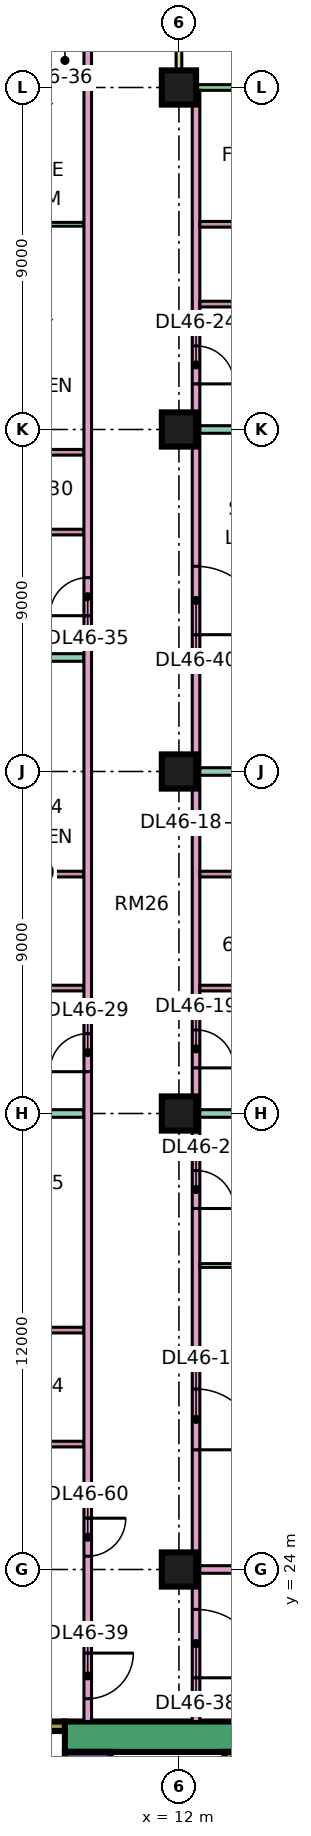
"""IFC4 building model, lengths in metres.
Left out: names, types, materials, properties, quantities, classifications, styles, units other than length and angle.
Written with IfcOpenShell. Run it as: python <this file> out.ifc"""

import sys

from ifc_helpers import new_model, si_unit, direction, frame, frame_2d, origin, origin_2d, place, context, subcontext, project, spatial, rectangle, extrude, element, fill, save


model = new_model("IFC4")
c1 = context("Model", 3, precision=1e-05, world=origin(), true_north=direction((0.0, 1.0)))
c2 = subcontext(c1, "Body", "Model", "MODEL_VIEW")
j1 = project(units=[si_unit("LENGTHUNIT", "METRE"), si_unit("PLANEANGLEUNIT", "RADIAN")], contexts=[c1])
p1 = place(None, origin())
s1 = spatial("IfcSite", under=j1, at=p1, CompositionType="ELEMENT")
p2 = place(p1, origin())
s2 = spatial("IfcBuilding", under=s1, at=p2, CompositionType="ELEMENT")
p3 = place(p2, frame((0.0, 0.0, 198.65)))
s3 = spatial("IfcBuildingStorey", under=s2, at=p3, CompositionType="ELEMENT", Elevation=198.65)
for number, where, z_axis, x_axis in (
    (1, (12.0, 24.0, 0.0), (0.0, 0.0, 1.0), (1.0, 0.0, 0.0)),
    (2, (12.0, 36.0, 0.0), (0.0, 0.0, 1.0), (1.0, 0.0, 0.0)),
    (3, (12.0, 45.0, 0.0), (0.0, 0.0, 1.0), (1.0, 0.0, 0.0)),
    (4, (12.0, 54.0, 0.0), (0.0, 0.0, 1.0), (1.0, 0.0, 0.0)),
    (5, (12.0, 63.0, 0.0), (0.0, 0.0, 1.0), (1.0, 0.0, 0.0)),
):
    element("IfcColumn", number, at=place(p3, frame(where, z_axis=z_axis, x_axis=x_axis)), inside=s3, PredefinedType="COLUMN", context=c2, shape_type="SweptSolid", body=[
        extrude(rectangle(XDim=0.9, YDim=0.9, at=origin_2d()), origin(), (0.0, 0.0, 1.0), 3.75),
    ])
p4 = place(p3, frame((9.0, 19.6, 0.0), z_axis=(0.0, 0.0, 1.0), x_axis=(1.0, 0.0, 0.0)))
e6 = element("IfcWall", 6, at=p4, inside=s3, PredefinedType="SHEAR", context=c2, shape_type="SweptSolid", body=[
    extrude(rectangle(XDim=25.0, YDim=0.8, at=frame_2d((12.5, 0.0))), origin(), (0.0, 0.0, 1.0), 3.75),
])
p5 = place(p4, frame((19.1, 0.0, 0.0)))
e7 = element("IfcOpeningElement", 7, at=p5, cuts=e6, PredefinedType="OPENING", context=c2, shape_type="SweptSolid", body=[
    extrude(rectangle(XDim=1.8, YDim=2.4, at=frame_2d((0.9, 1.2))), frame((0.0, 0.41, 0.0), z_axis=(0.0, -1.0, 0.0), x_axis=(1.0, 0.0, 0.0)), (0.0, 0.0, 1.0), 0.82),
])
p6 = place(p3, frame((9.6, 7.8, 0.0), z_axis=(0.0, 0.0, 1.0), x_axis=(0.0, 1.0, 0.0)))
e8 = element("IfcWall", 8, at=p6, inside=s3, PredefinedType="SHEAR", context=c2, shape_type="SweptSolid", body=[
    extrude(rectangle(XDim=11.4, YDim=1.2, at=frame_2d((5.7, 0.0))), origin(), (0.0, 0.0, 1.0), 3.75),
])
p7 = place(p6, frame((4.075, 0.0, 0.0)))
e9 = element("IfcOpeningElement", 9, at=p7, cuts=e8, PredefinedType="OPENING", context=c2, shape_type="SweptSolid", body=[
    extrude(rectangle(XDim=1.1, YDim=2.2, at=frame_2d((0.55, 1.1))), frame((0.0, 0.61, 0.0), z_axis=(0.0, -1.0, 0.0), x_axis=(1.0, 0.0, 0.0)), (0.0, 0.0, 1.0), 1.22),
])
p8 = place(p6, frame((6.575, 0.0, 0.0)))
e10 = element("IfcOpeningElement", 10, at=p8, cuts=e8, PredefinedType="OPENING", context=c2, shape_type="SweptSolid", body=[
    extrude(rectangle(XDim=1.1, YDim=2.2, at=frame_2d((0.55, 1.1))), frame((0.0, 0.61, 0.0), z_axis=(0.0, -1.0, 0.0), x_axis=(1.0, 0.0, 0.0)), (0.0, 0.0, 1.0), 1.22),
])
p9 = place(p6, frame((9.4, 0.0, 0.0)))
e11 = element("IfcOpeningElement", 11, at=p9, cuts=e8, PredefinedType="OPENING", context=c2, shape_type="SweptSolid", body=[
    extrude(rectangle(XDim=1.1, YDim=2.2, at=frame_2d((0.55, 1.1))), frame((0.0, 0.61, 0.0), z_axis=(0.0, -1.0, 0.0), x_axis=(1.0, 0.0, 0.0)), (0.0, 0.0, 1.0), 1.22),
])
p10 = place(p6, frame((1.75, 0.0, 0.0)))
e12 = element("IfcOpeningElement", 12, at=p10, cuts=e8, PredefinedType="OPENING", context=c2, shape_type="SweptSolid", body=[
    extrude(rectangle(XDim=0.9, YDim=2.1, at=frame_2d((0.45, 1.05))), frame((0.0, 0.61, 0.0), z_axis=(0.0, -1.0, 0.0), x_axis=(1.0, 0.0, 0.0)), (0.0, 0.0, 1.0), 1.22),
])
p11 = place(p3, frame((13.325, 7.8, 0.0), z_axis=(0.0, 0.0, 1.0), x_axis=(0.0, 1.0, 0.0)))
e13 = element("IfcWall", 13, at=p11, inside=s3, PredefinedType="SHEAR", context=c2, shape_type="SweptSolid", body=[
    extrude(rectangle(XDim=11.4, YDim=0.25, at=frame_2d((5.7, 0.0))), origin(), (0.0, 0.0, 1.0), 3.75),
])
p12 = place(p3, frame((2.1, 19.875, 0.0), z_axis=(0.0, 0.0, 1.0), x_axis=(1.0, 0.0, 0.0)))
e14 = element("IfcWall", 14, at=p12, inside=s3, PredefinedType="SHEAR", context=c2, shape_type="SweptSolid", body=[
    extrude(rectangle(XDim=6.9, YDim=0.25, at=frame_2d((3.45, 0.0))), origin(), (0.0, 0.0, 1.0), 3.75),
])
p13 = place(p12, frame((1.175, 0.0, 0.0)))
e15 = element("IfcOpeningElement", 15, at=p13, cuts=e14, PredefinedType="OPENING", context=c2, shape_type="SweptSolid", body=[
    extrude(rectangle(XDim=1.1, YDim=2.2, at=frame_2d((0.55, 1.1))), frame((0.0, 0.135, 0.0), z_axis=(0.0, -1.0, 0.0), x_axis=(1.0, 0.0, 0.0)), (0.0, 0.0, 1.0), 0.27),
])
p14 = place(p12, frame((4.6, 0.0, 0.0)))
e16 = element("IfcOpeningElement", 16, at=p14, cuts=e14, PredefinedType="OPENING", context=c2, shape_type="SweptSolid", body=[
    extrude(rectangle(XDim=1.2, YDim=2.2, at=frame_2d((0.6, 1.1))), frame((0.0, 0.135, 0.0), z_axis=(0.0, -1.0, 0.0), x_axis=(1.0, 0.0, 0.0)), (0.0, 0.0, 1.0), 0.27),
])
p15 = place(p3, frame((22.425, 63.0, 0.0), z_axis=(0.0, 0.0, 1.0), x_axis=(-1.0, 0.0, 0.0)))
e17 = element("IfcWall", 17, at=p15, inside=s3, PredefinedType="SOLIDWALL", context=c2, shape_type="SweptSolid", body=[
    extrude(rectangle(XDim=10.35, YDim=0.15, at=frame_2d((5.175, 0.0))), origin(), (0.0, 0.0, 1.0), 3.35),
])
p16 = place(p15, frame((0.788, 0.0, 0.0)))
e18 = element("IfcOpeningElement", 18, at=p16, cuts=e17, PredefinedType="OPENING", context=c2, shape_type="SweptSolid", body=[
    extrude(rectangle(XDim=1.8, YDim=2.4, at=frame_2d((0.9, 1.2))), frame((0.0, 0.085, 0.0), z_axis=(0.0, -1.0, 0.0), x_axis=(1.0, 0.0, 0.0)), (0.0, 0.0, 1.0), 0.17),
])
p17 = place(p15, frame((5.725, 0.0, 0.45)))
e19 = element("IfcOpeningElement", 19, at=p17, cuts=e17, PredefinedType="OPENING", context=c2, shape_type="SweptSolid", body=[
    extrude(rectangle(XDim=3.0, YDim=2.4, at=frame_2d((1.5, 1.2))), frame((0.0, 0.085, 0.0), z_axis=(0.0, -1.0, 0.0), x_axis=(1.0, 0.0, 0.0)), (0.0, 0.0, 1.0), 0.17),
])
p18 = place(p3, frame((12.0, 64.5, 0.0), z_axis=(0.0, 0.0, 1.0), x_axis=(0.0, -1.0, 0.0)))
e20 = element("IfcWall", 20, at=p18, inside=s3, PredefinedType="SOLIDWALL", context=c2, shape_type="SweptSolid", body=[
    extrude(rectangle(XDim=1.5, YDim=0.15, at=frame_2d((0.75, 0.0))), origin(), (0.0, 0.0, 1.0), 3.35),
])
p19 = place(p3, frame((0.0, 48.0, 0.0), z_axis=(0.0, 0.0, 1.0), x_axis=(1.0, 0.0, 0.0)))
e21 = element("IfcWall", 21, at=p19, inside=s3, PredefinedType="PARTITIONING", context=c2, shape_type="SweptSolid", body=[
    extrude(rectangle(XDim=9.5, YDim=0.2, at=frame_2d((4.75, 0.0))), origin(), (0.0, 0.0, 1.0), 3.35),
])
p20 = place(p3, frame((0.074, 22.4, 0.0), z_axis=(0.0, 0.0, 1.0), x_axis=(1.0, 0.0, 0.0)))
e22 = element("IfcWall", 22, at=p20, inside=s3, PredefinedType="PARTITIONING", context=c2, shape_type="SweptSolid", body=[
    extrude(rectangle(XDim=9.426, YDim=0.2, at=frame_2d((4.713, 0.0))), origin(), (0.0, 0.0, 1.0), 3.35),
])
p21 = place(p3, frame((5.65, 36.0, 0.0), z_axis=(0.0, 0.0, 1.0), x_axis=(1.0, 0.0, 0.0)))
e23 = element("IfcWall", 23, at=p21, inside=s3, PredefinedType="PARTITIONING", context=c2, shape_type="SweptSolid", body=[
    extrude(rectangle(XDim=3.85, YDim=0.2, at=frame_2d((1.925, 0.0))), origin(), (0.0, 0.0, 1.0), 3.35),
])
for number, where, z_axis, x_axis in (
    (24, (6.675, 39.3, 0.0), (0.0, 0.0, 1.0), (1.0, 0.0, 0.0)),
    (25, (6.675, 42.3, 0.0), (0.0, 0.0, 1.0), (1.0, 0.0, 0.0)),
):
    element("IfcWall", number, at=place(p3, frame(where, z_axis=z_axis, x_axis=x_axis)), inside=s3, PredefinedType="PARTITIONING", context=c2, shape_type="SweptSolid", body=[
        extrude(rectangle(XDim=2.825, YDim=0.15, at=frame_2d((1.413, 0.0))), origin(), (0.0, 0.0, 1.0), 3.35),
    ])
p22 = place(p3, frame((6.675, 51.3, 0.0), z_axis=(0.0, 0.0, 1.0), x_axis=(1.0, 0.0, 0.0)))
e26 = element("IfcWall", 26, at=p22, inside=s3, PredefinedType="PARTITIONING", context=c2, shape_type="SweptSolid", body=[
    extrude(rectangle(XDim=2.825, YDim=0.15, at=frame_2d((1.413, 0.0))), origin(), (0.0, 0.0, 1.0), 3.35),
])
p23 = place(p22, frame((1.075, 0.0, 0.0)))
e27 = element("IfcOpeningElement", 27, at=p23, cuts=e26, PredefinedType="OPENING", context=c2, shape_type="SweptSolid", body=[
    extrude(rectangle(XDim=0.8, YDim=2.1, at=frame_2d((0.4, 1.05))), frame((0.0, 0.085, 0.0), z_axis=(0.0, -1.0, 0.0), x_axis=(1.0, 0.0, 0.0)), (0.0, 0.0, 1.0), 0.17),
])
p24 = place(p3, frame((6.675, 53.4, 0.0), z_axis=(0.0, 0.0, 1.0), x_axis=(1.0, 0.0, 0.0)))
e28 = element("IfcWall", 28, at=p24, inside=s3, PredefinedType="PARTITIONING", context=c2, shape_type="SweptSolid", body=[
    extrude(rectangle(XDim=2.825, YDim=0.15, at=frame_2d((1.413, 0.0))), origin(), (0.0, 0.0, 1.0), 3.35),
])
p25 = place(p3, frame((6.675, 59.4, 0.0), z_axis=(0.0, 0.0, 1.0), x_axis=(1.0, 0.0, 0.0)))
e29 = element("IfcWall", 29, at=p25, inside=s3, PredefinedType="PARTITIONING", context=c2, shape_type="SweptSolid", body=[
    extrude(rectangle(XDim=2.825, YDim=0.1, at=frame_2d((1.413, 0.0))), origin(), (0.0, 0.0, 1.0), 3.35),
])
for number, where, z_axis, x_axis in (
    (30, (6.975, 27.3, 0.0), (0.0, 0.0, 1.0), (1.0, 0.0, 0.0)),
    (31, (6.975, 30.3, 0.0), (0.0, 0.0, 1.0), (1.0, 0.0, 0.0)),
):
    element("IfcWall", number, at=place(p3, frame(where, z_axis=z_axis, x_axis=x_axis)), inside=s3, PredefinedType="PARTITIONING", context=c2, shape_type="SweptSolid", body=[
        extrude(rectangle(XDim=2.525, YDim=0.15, at=frame_2d((1.262, 0.0))), origin(), (0.0, 0.0, 1.0), 3.35),
    ])
p26 = place(p3, frame((9.6, 20.0, 0.0), z_axis=(0.0, 0.0, 1.0), x_axis=(0.0, 1.0, 0.0)))
e32 = element("IfcWall", 32, at=p26, inside=s3, PredefinedType="PARTITIONING", context=c2, shape_type="SweptSolid", body=[
    extrude(rectangle(XDim=44.35, YDim=0.2, at=frame_2d((22.175, 0.0))), origin(), (0.0, 0.0, 1.0), 3.35),
])
p27 = place(p26, frame((17.1, 0.0, 0.0)))
e33 = element("IfcOpeningElement", 33, at=p27, cuts=e32, PredefinedType="OPENING", context=c2, shape_type="SweptSolid", body=[
    extrude(rectangle(XDim=1.0, YDim=2.1, at=frame_2d((0.5, 1.05))), frame((0.0, 0.11, 0.0), z_axis=(0.0, -1.0, 0.0), x_axis=(1.0, 0.0, 0.0)), (0.0, 0.0, 1.0), 0.22),
])
p28 = place(p26, frame((29.1, 0.0, 0.0)))
e34 = element("IfcOpeningElement", 34, at=p28, cuts=e32, PredefinedType="OPENING", context=c2, shape_type="SweptSolid", body=[
    extrude(rectangle(XDim=1.0, YDim=2.1, at=frame_2d((0.5, 1.05))), frame((0.0, 0.11, 0.0), z_axis=(0.0, -1.0, 0.0), x_axis=(1.0, 0.0, 0.0)), (0.0, 0.0, 1.0), 0.22),
])
p29 = place(p26, frame((0.6, 0.0, 0.0)))
e35 = element("IfcOpeningElement", 35, at=p29, cuts=e32, PredefinedType="OPENING", context=c2, shape_type="SweptSolid", body=[
    extrude(rectangle(XDim=1.2, YDim=2.1, at=frame_2d((0.6, 1.05))), frame((0.0, 0.11, 0.0), z_axis=(0.0, -1.0, 0.0), x_axis=(1.0, 0.0, 0.0)), (0.0, 0.0, 1.0), 0.22),
])
p30 = place(p26, frame((4.35, 0.0, 0.0)))
e36 = element("IfcOpeningElement", 36, at=p30, cuts=e32, PredefinedType="OPENING", context=c2, shape_type="SweptSolid", body=[
    extrude(rectangle(XDim=1.0, YDim=2.1, at=frame_2d((0.5, 1.05))), frame((0.0, 0.11, 0.0), z_axis=(0.0, -1.0, 0.0), x_axis=(1.0, 0.0, 0.0)), (0.0, 0.0, 1.0), 0.22),
])
p31 = place(p3, frame((12.45, 20.0, 0.0), z_axis=(0.0, 0.0, 1.0), x_axis=(0.0, 1.0, 0.0)))
e37 = element("IfcWall", 37, at=p31, inside=s3, PredefinedType="PARTITIONING", context=c2, shape_type="SweptSolid", body=[
    extrude(rectangle(XDim=42.926, YDim=0.2, at=frame_2d((21.463, 0.0))), origin(), (0.0, 0.0, 1.0), 3.35),
])
p32 = place(p31, frame((7.15, 0.0, 0.0)))
e38 = element("IfcOpeningElement", 38, at=p32, cuts=e37, PredefinedType="OPENING", context=c2, shape_type="SweptSolid", body=[
    extrude(rectangle(XDim=1.6, YDim=2.1, at=frame_2d((0.8, 1.05))), frame((0.0, 0.11, 0.0), z_axis=(0.0, -1.0, 0.0), x_axis=(1.0, 0.0, 0.0)), (0.0, 0.0, 1.0), 0.22),
])
p33 = place(p31, frame((13.5, 0.0, 0.0)))
e39 = element("IfcOpeningElement", 39, at=p33, cuts=e37, PredefinedType="OPENING", context=c2, shape_type="SweptSolid", body=[
    extrude(rectangle(XDim=1.0, YDim=2.1, at=frame_2d((0.5, 1.05))), frame((0.0, 0.11, 0.0), z_axis=(0.0, -1.0, 0.0), x_axis=(1.0, 0.0, 0.0)), (0.0, 0.0, 1.0), 0.22),
])
p34 = place(p31, frame((17.2, 0.0, 0.0)))
e40 = element("IfcOpeningElement", 40, at=p34, cuts=e37, PredefinedType="OPENING", context=c2, shape_type="SweptSolid", body=[
    extrude(rectangle(XDim=1.0, YDim=2.1, at=frame_2d((0.5, 1.05))), frame((0.0, 0.11, 0.0), z_axis=(0.0, -1.0, 0.0), x_axis=(1.0, 0.0, 0.0)), (0.0, 0.0, 1.0), 0.22),
])
p35 = place(p31, frame((35.2, 0.0, 0.0)))
e41 = element("IfcOpeningElement", 41, at=p35, cuts=e37, PredefinedType="OPENING", context=c2, shape_type="SweptSolid", body=[
    extrude(rectangle(XDim=1.0, YDim=2.1, at=frame_2d((0.5, 1.05))), frame((0.0, 0.11, 0.0), z_axis=(0.0, -1.0, 0.0), x_axis=(1.0, 0.0, 0.0)), (0.0, 0.0, 1.0), 0.22),
])
p36 = place(p31, frame((1.15, 0.0, 0.0)))
e42 = element("IfcOpeningElement", 42, at=p36, cuts=e37, PredefinedType="OPENING", context=c2, shape_type="SweptSolid", body=[
    extrude(rectangle(XDim=1.8, YDim=2.1, at=frame_2d((0.9, 1.05))), frame((0.0, 0.11, 0.0), z_axis=(0.0, -1.0, 0.0), x_axis=(1.0, 0.0, 0.0)), (0.0, 0.0, 1.0), 0.22),
])
p37 = place(p31, frame((28.6, 0.0, 0.0)))
e43 = element("IfcOpeningElement", 43, at=p37, cuts=e37, PredefinedType="OPENING", context=c2, shape_type="SweptSolid", body=[
    extrude(rectangle(XDim=1.8, YDim=2.1, at=frame_2d((0.9, 1.05))), frame((0.0, 0.11, 0.0), z_axis=(0.0, -1.0, 0.0), x_axis=(1.0, 0.0, 0.0)), (0.0, 0.0, 1.0), 0.22),
])
p38 = place(p3, frame((12.55, 24.0, 0.0), z_axis=(0.0, 0.0, 1.0), x_axis=(1.0, 0.0, 0.0)))
e44 = element("IfcWall", 44, at=p38, inside=s3, PredefinedType="PARTITIONING", context=c2, shape_type="SweptSolid", body=[
    extrude(rectangle(XDim=8.95, YDim=0.2, at=frame_2d((4.475, 0.0))), origin(), (0.0, 0.0, 1.0), 3.35),
])
p39 = place(p3, frame((12.55, 32.0, 0.0), z_axis=(0.0, 0.0, 1.0), x_axis=(1.0, 0.0, 0.0)))
e45 = element("IfcWall", 45, at=p39, inside=s3, PredefinedType="PARTITIONING", context=c2, shape_type="SweptSolid", body=[
    extrude(rectangle(XDim=8.95, YDim=0.1, at=frame_2d((4.475, 0.0))), origin(), (0.0, 0.0, 1.0), 3.35),
])
p40 = place(p3, frame((12.55, 36.0, 0.0), z_axis=(0.0, 0.0, 1.0), x_axis=(1.0, 0.0, 0.0)))
e46 = element("IfcWall", 46, at=p40, inside=s3, PredefinedType="PARTITIONING", context=c2, shape_type="SweptSolid", body=[
    extrude(rectangle(XDim=11.45, YDim=0.2, at=frame_2d((5.725, 0.0))), origin(), (0.0, 0.0, 1.0), 3.35),
])
for number, where, z_axis, x_axis in (
    (47, (12.55, 39.3, 0.0), (0.0, 0.0, 1.0), (1.0, 0.0, 0.0)),
    (48, (12.55, 42.3, 0.0), (0.0, 0.0, 1.0), (1.0, 0.0, 0.0)),
):
    element("IfcWall", number, at=place(p3, frame(where, z_axis=z_axis, x_axis=x_axis)), inside=s3, PredefinedType="PARTITIONING", context=c2, shape_type="SweptSolid", body=[
        extrude(rectangle(XDim=4.625, YDim=0.15, at=frame_2d((2.312, 0.0))), origin(), (0.0, 0.0, 1.0), 3.35),
    ])
p41 = place(p3, frame((12.55, 45.0, 0.0), z_axis=(0.0, 0.0, 1.0), x_axis=(1.0, 0.0, 0.0)))
e49 = element("IfcWall", 49, at=p41, inside=s3, PredefinedType="PARTITIONING", context=c2, shape_type="SweptSolid", body=[
    extrude(rectangle(XDim=11.376, YDim=0.2, at=frame_2d((5.688, 0.0))), origin(), (0.0, 0.0, 1.0), 3.35),
])
p42 = place(p3, frame((12.55, 54.0, 0.0), z_axis=(0.0, 0.0, 1.0), x_axis=(1.0, 0.0, 0.0)))
e50 = element("IfcWall", 50, at=p42, inside=s3, PredefinedType="PARTITIONING", context=c2, shape_type="SweptSolid", body=[
    extrude(rectangle(XDim=11.45, YDim=0.2, at=frame_2d((5.725, 0.0))), origin(), (0.0, 0.0, 1.0), 3.35),
])
for number, where, z_axis, x_axis in (
    (51, (12.55, 57.3, 0.0), (0.0, 0.0, 1.0), (1.0, 0.0, 0.0)),
    (52, (12.55, 59.4, 0.0), (0.0, 0.0, 1.0), (1.0, 0.0, 0.0)),
):
    element("IfcWall", number, at=place(p3, frame(where, z_axis=z_axis, x_axis=x_axis)), inside=s3, PredefinedType="PARTITIONING", context=c2, shape_type="SweptSolid", body=[
        extrude(rectangle(XDim=5.225, YDim=0.15, at=frame_2d((2.612, 0.0))), origin(), (0.0, 0.0, 1.0), 3.35),
    ])
p43 = place(p32, frame((1.6, 0.0, 0.0), z_axis=(0.0, 0.0, 1.0), x_axis=(-1.0, 0.0, 0.0)))
e53 = element("IfcDoor", 53, at=p43, inside=s3, OperationType="DOUBLE_DOOR_SINGLE_SWING", PredefinedType="DOOR", context=c2, shape_type="SweptSolid", body=[
    extrude(rectangle(XDim=1.6, YDim=2.1, at=frame_2d((0.8, 1.05))), frame((0.0, 0.025, 0.0), z_axis=(0.0, -1.0, 0.0), x_axis=(1.0, 0.0, 0.0)), (0.0, 0.0, 1.0), 0.05),
])
fill(e38, e53)
p44 = place(p33, frame((1.0, 0.0, 0.0), z_axis=(0.0, 0.0, 1.0), x_axis=(-1.0, 0.0, 0.0)))
e54 = element("IfcDoor", 54, at=p44, inside=s3, OperationType="SINGLE_SWING_LEFT", PredefinedType="DOOR", context=c2, shape_type="SweptSolid", body=[
    extrude(rectangle(XDim=1.0, YDim=2.1, at=frame_2d((0.5, 1.05))), frame((0.0, 0.025, 0.0), z_axis=(0.0, -1.0, 0.0), x_axis=(1.0, 0.0, 0.0)), (0.0, 0.0, 1.0), 0.05),
])
fill(e39, e54)
p45 = place(p34, frame((1.0, 0.0, 0.0), z_axis=(0.0, 0.0, 1.0), x_axis=(-1.0, 0.0, 0.0)))
e55 = element("IfcDoor", 55, at=p45, inside=s3, OperationType="SINGLE_SWING_LEFT", PredefinedType="DOOR", context=c2, shape_type="SweptSolid", body=[
    extrude(rectangle(XDim=1.0, YDim=2.1, at=frame_2d((0.5, 1.05))), frame((0.0, 0.025, 0.0), z_axis=(0.0, -1.0, 0.0), x_axis=(1.0, 0.0, 0.0)), (0.0, 0.0, 1.0), 0.05),
])
fill(e40, e55)
p46 = place(p35, frame((1.0, 0.0, 0.0), z_axis=(0.0, 0.0, 1.0), x_axis=(-1.0, 0.0, 0.0)))
e56 = element("IfcDoor", 56, at=p46, inside=s3, OperationType="SINGLE_SWING_LEFT", PredefinedType="DOOR", context=c2, shape_type="SweptSolid", body=[
    extrude(rectangle(XDim=1.0, YDim=2.1, at=frame_2d((0.5, 1.05))), frame((0.0, 0.025, 0.0), z_axis=(0.0, -1.0, 0.0), x_axis=(1.0, 0.0, 0.0)), (0.0, 0.0, 1.0), 0.05),
])
fill(e41, e56)
p47 = place(p27, origin())
e57 = element("IfcDoor", 57, at=p47, inside=s3, OperationType="SINGLE_SWING_LEFT", PredefinedType="DOOR", context=c2, shape_type="SweptSolid", body=[
    extrude(rectangle(XDim=1.0, YDim=2.1, at=frame_2d((0.5, 1.05))), frame((0.0, 0.025, 0.0), z_axis=(0.0, -1.0, 0.0), x_axis=(1.0, 0.0, 0.0)), (0.0, 0.0, 1.0), 0.05),
])
fill(e33, e57)
p48 = place(p28, origin())
e58 = element("IfcDoor", 58, at=p48, inside=s3, OperationType="SINGLE_SWING_LEFT", PredefinedType="DOOR", context=c2, shape_type="SweptSolid", body=[
    extrude(rectangle(XDim=1.0, YDim=2.1, at=frame_2d((0.5, 1.05))), frame((0.0, 0.025, 0.0), z_axis=(0.0, -1.0, 0.0), x_axis=(1.0, 0.0, 0.0)), (0.0, 0.0, 1.0), 0.05),
])
fill(e34, e58)
p49 = place(p36, frame((1.8, 0.0, 0.0), z_axis=(0.0, 0.0, 1.0), x_axis=(-1.0, 0.0, 0.0)))
e59 = element("IfcDoor", 59, at=p49, inside=s3, OperationType="DOUBLE_DOOR_SINGLE_SWING", PredefinedType="DOOR", context=c2, shape_type="SweptSolid", body=[
    extrude(rectangle(XDim=1.8, YDim=2.1, at=frame_2d((0.9, 1.05))), frame((0.0, 0.025, 0.0), z_axis=(0.0, -1.0, 0.0), x_axis=(1.0, 0.0, 0.0)), (0.0, 0.0, 1.0), 0.05),
])
fill(e42, e59)
p50 = place(p29, origin())
e60 = element("IfcDoor", 60, at=p50, inside=s3, OperationType="SINGLE_SWING_RIGHT", PredefinedType="DOOR", context=c2, shape_type="SweptSolid", body=[
    extrude(rectangle(XDim=1.2, YDim=2.1, at=frame_2d((0.6, 1.05))), frame((0.0, 0.025, 0.0), z_axis=(0.0, -1.0, 0.0), x_axis=(1.0, 0.0, 0.0)), (0.0, 0.0, 1.0), 0.05),
])
fill(e35, e60)
p51 = place(p37, frame((1.8, 0.0, 0.0), z_axis=(0.0, 0.0, 1.0), x_axis=(-1.0, 0.0, 0.0)))
e61 = element("IfcDoor", 61, at=p51, inside=s3, OperationType="DOUBLE_DOOR_SINGLE_SWING", PredefinedType="DOOR", context=c2, shape_type="SweptSolid", body=[
    extrude(rectangle(XDim=1.8, YDim=2.1, at=frame_2d((0.9, 1.05))), frame((0.0, 0.025, 0.0), z_axis=(0.0, -1.0, 0.0), x_axis=(1.0, 0.0, 0.0)), (0.0, 0.0, 1.0), 0.05),
])
fill(e43, e61)
p52 = place(p30, origin())
e62 = element("IfcDoor", 62, at=p52, inside=s3, OperationType="SINGLE_SWING_RIGHT", PredefinedType="DOOR", context=c2, shape_type="SweptSolid", body=[
    extrude(rectangle(XDim=1.0, YDim=2.1, at=frame_2d((0.5, 1.05))), frame((0.0, 0.025, 0.0), z_axis=(0.0, -1.0, 0.0), x_axis=(1.0, 0.0, 0.0)), (0.0, 0.0, 1.0), 0.05),
])
fill(e36, e62)
save(model, sys.argv[1])
